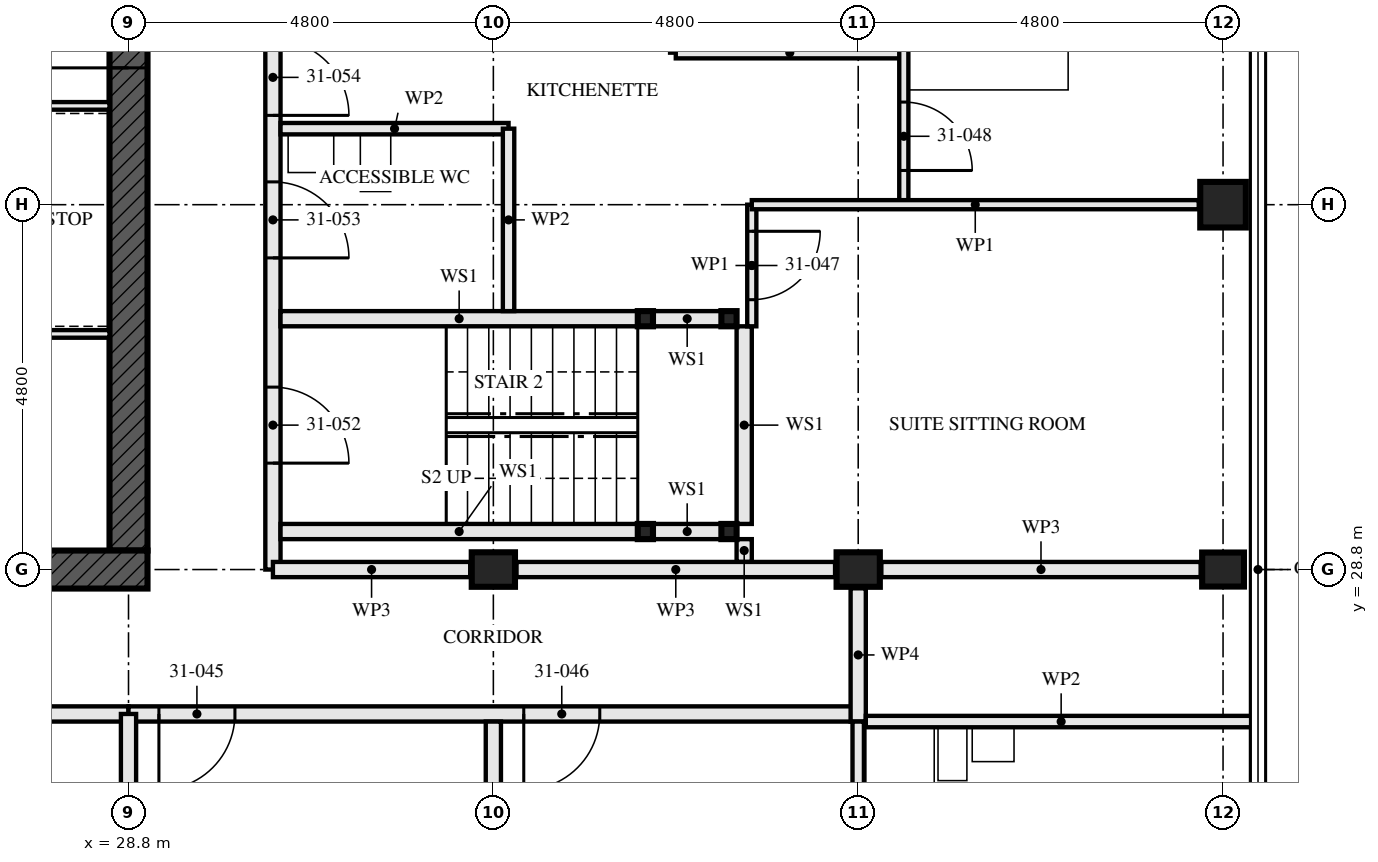
"""IFC4 building model, lengths in metres.
Left out: names, types, materials, properties, quantities, classifications, styles, units other than length and angle.
Written with IfcOpenShell. Run it as: python <this file> out.ifc"""

import sys

from ifc_helpers import new_model, si_unit, direction, frame, frame_2d, origin, origin_2d, place, context, subcontext, project, spatial, rectangle, hollow_rectangle, i_section, extrude, element, fill, save


model = new_model("IFC4")
c1 = context("Model", 3, precision=1e-05, world=origin(), true_north=direction((0.0, 1.0)))
c2 = subcontext(c1, "Body", "Model", "MODEL_VIEW")
j1 = project(units=[si_unit("LENGTHUNIT", "METRE"), si_unit("PLANEANGLEUNIT", "RADIAN")], contexts=[c1])
p1 = place(None, origin())
s1 = spatial("IfcSite", under=j1, at=p1, CompositionType="ELEMENT")
p2 = place(p1, origin())
s2 = spatial("IfcBuilding", under=s1, at=p2, CompositionType="ELEMENT")
p3 = place(p2, frame((0.0, 0.0, 115.5)))
s3 = spatial("IfcBuildingStorey", under=s2, at=p3, CompositionType="ELEMENT", Elevation=115.5)
for number, where, z_axis, x_axis in (
    (1, (33.6, 28.8, 0.0), (0.0, 0.0, 1.0), (0.0, 1.0, 0.0)),
    (2, (38.4, 28.8, 0.0), (0.0, 0.0, 1.0), (0.0, 1.0, 0.0)),
):
    element("IfcColumn", number, at=place(p3, frame(where, z_axis=z_axis, x_axis=x_axis)), inside=s3, PredefinedType="COLUMN", context=c2, shape_type="SweptSolid", body=[
        extrude(i_section(OverallWidth=0.454, OverallDepth=0.569, WebThickness=0.078, FlangeThickness=0.125, FilletRadius=0.015, at=origin_2d()), origin(), (0.0, 0.0, 1.0), 3.5),
    ])
p4 = place(p3, frame((43.2, 28.8, 0.0), z_axis=(0.0, 0.0, 1.0), x_axis=(0.0, 1.0, 0.0)))
e3 = element("IfcColumn", 3, at=p4, inside=s3, PredefinedType="COLUMN", context=c2, shape_type="SweptSolid", body=[
    extrude(i_section(OverallWidth=0.448, OverallDepth=0.55, WebThickness=0.072, FlangeThickness=0.115, FilletRadius=0.015, at=origin_2d()), origin(), (0.0, 0.0, 1.0), 3.5),
])
p5 = place(p3, frame((43.2, 33.6, 0.0), z_axis=(0.0, 0.0, 1.0), x_axis=(1.0, 0.0, 0.0)))
e4 = element("IfcColumn", 4, at=p5, inside=s3, PredefinedType="COLUMN", context=c2, shape_type="SweptSolid", body=[
    extrude(hollow_rectangle(XDim=0.6, YDim=0.6, WallThickness=0.08, at=origin_2d()), origin(), (0.0, 0.0, 1.0), 3.5),
])
p6 = place(p3, frame((14.15, 28.8, -0.17), z_axis=(0.0, 0.0, 1.0), x_axis=(1.0, 0.0, 0.0)))
e5 = element("IfcWall", 5, at=p6, inside=s3, PredefinedType="SHEAR", context=c2, shape_type="SweptSolid", body=[
    extrude(rectangle(XDim=14.9, YDim=0.5, at=frame_2d((7.45, 0.0))), origin(), (0.0, 0.0, 1.0), 3.5),
])
p7 = place(p6, frame((6.85, 0.0, 0.17)))
e6 = element("IfcOpeningElement", 6, at=p7, cuts=e5, PredefinedType="OPENING", context=c2, shape_type="SweptSolid", body=[
    extrude(rectangle(XDim=1.2, YDim=2.1, at=frame_2d((0.6, 1.05))), frame((0.0, 0.26, 0.0), z_axis=(0.0, -1.0, 0.0), x_axis=(1.0, 0.0, 0.0)), (0.0, 0.0, 1.0), 0.521),
])
p8 = place(p3, frame((28.8, 29.05, -0.17), z_axis=(0.0, 0.0, 1.0), x_axis=(0.0, 1.0, 0.0)))
e7 = element("IfcWall", 7, at=p8, inside=s3, PredefinedType="SHEAR", context=c2, shape_type="SweptSolid", body=[
    extrude(rectangle(XDim=13.9, YDim=0.5, at=frame_2d((6.95, 0.0))), origin(), (0.0, 0.0, 1.0), 3.5),
])
p9 = place(p8, frame((6.35, 0.0, 0.17)))
e8 = element("IfcOpeningElement", 8, at=p9, cuts=e7, PredefinedType="OPENING", context=c2, shape_type="SweptSolid", body=[
    extrude(rectangle(XDim=1.2, YDim=2.1, at=frame_2d((0.6, 1.05))), frame((0.0, 0.26, 0.0), z_axis=(0.0, -1.0, 0.0), x_axis=(1.0, 0.0, 0.0)), (0.0, 0.0, 1.0), 0.521),
])
for number, where, z_axis, x_axis in (
    (9, (36.7, 29.3, 0.0), (0.0, 0.0, 1.0), (1.0, 0.0, 0.0)),
    (10, (36.7, 32.1, 0.0), (0.0, 0.0, 1.0), (1.0, 0.0, 0.0)),
    (11, (35.6, 29.3, 0.0), (0.0, 0.0, 1.0), (1.0, 0.0, 0.0)),
    (12, (35.6, 32.1, 0.0), (0.0, 0.0, 1.0), (1.0, 0.0, 0.0)),
):
    element("IfcColumn", number, at=place(p3, frame(where, z_axis=z_axis, x_axis=x_axis)), inside=s3, PredefinedType="COLUMN", context=c2, shape_type="SweptSolid", body=[
        extrude(hollow_rectangle(XDim=0.2, YDim=0.2, WallThickness=0.008, at=origin_2d()), origin(), (0.0, 0.0, 1.0), 3.33),
    ])
p10 = place(p3, frame((13.96, 26.9, 0.0), z_axis=(0.0, 0.0, 1.0), x_axis=(1.0, 0.0, 0.0)))
e13 = element("IfcWall", 13, at=p10, inside=s3, PredefinedType="PARTITIONING", context=c2, shape_type="SweptSolid", body=[
    extrude(rectangle(XDim=14.84, YDim=0.2, at=frame_2d((7.42, 0.0))), origin(), (0.0, 0.0, 1.0), 2.32),
])
p11 = place(p10, frame((1.84, 0.0, 0.0)))
e14 = element("IfcOpeningElement", 14, at=p11, cuts=e13, PredefinedType="OPENING", context=c2, shape_type="SweptSolid", body=[
    extrude(rectangle(XDim=1.0, YDim=2.1, at=frame_2d((0.5, 1.05))), frame((0.0, 0.111, 0.0), z_axis=(0.0, -1.0, 0.0), x_axis=(1.0, 0.0, 0.0)), (0.0, 0.0, 1.0), 0.221),
])
p12 = place(p10, frame((4.09, 0.0, 0.0)))
e15 = element("IfcOpeningElement", 15, at=p12, cuts=e13, PredefinedType="OPENING", context=c2, shape_type="SweptSolid", body=[
    extrude(rectangle(XDim=0.9, YDim=2.1, at=frame_2d((0.45, 1.05))), frame((0.0, 0.111, 0.0), z_axis=(0.0, -1.0, 0.0), x_axis=(1.0, 0.0, 0.0)), (0.0, 0.0, 1.0), 0.221),
])
p13 = place(p10, frame((5.64, 0.0, 0.0)))
e16 = element("IfcOpeningElement", 16, at=p13, cuts=e13, PredefinedType="OPENING", context=c2, shape_type="SweptSolid", body=[
    extrude(rectangle(XDim=1.0, YDim=2.1, at=frame_2d((0.5, 1.05))), frame((0.0, 0.111, 0.0), z_axis=(0.0, -1.0, 0.0), x_axis=(1.0, 0.0, 0.0)), (0.0, 0.0, 1.0), 0.221),
])
p14 = place(p3, frame((33.6, 14.644, 0.0), z_axis=(0.0, 0.0, 1.0), x_axis=(0.0, 1.0, 0.0)))
e17 = element("IfcWall", 17, at=p14, inside=s3, PredefinedType="PARTITIONING", context=c2, shape_type="SweptSolid", body=[
    extrude(rectangle(XDim=12.156, YDim=0.2, at=frame_2d((6.078, 0.0))), origin(), (0.0, 0.0, 1.0), 2.55),
])
p15 = place(p3, frame((38.4, 23.8, 0.0), z_axis=(0.0, 0.0, 1.0), x_axis=(0.0, 1.0, 0.0)))
e18 = element("IfcWall", 18, at=p15, inside=s3, PredefinedType="PARTITIONING", context=c2, shape_type="SweptSolid", body=[
    extrude(rectangle(XDim=3.0, YDim=0.15, at=frame_2d((1.5, 0.0))), origin(), (0.0, 0.0, 1.0), 2.55),
])
p16 = place(p3, frame((28.8, 26.9, 0.0), z_axis=(0.0, 0.0, 1.0), x_axis=(1.0, 0.0, 0.0)))
e19 = element("IfcWall", 19, at=p16, inside=s3, PredefinedType="PARTITIONING", context=c2, shape_type="SweptSolid", body=[
    extrude(rectangle(XDim=9.6, YDim=0.2, at=frame_2d((4.8, 0.0))), origin(), (0.0, 0.0, 1.0), 3.33),
])
p17 = place(p16, frame((0.4, 0.0, 0.0)))
e20 = element("IfcOpeningElement", 20, at=p17, cuts=e19, PredefinedType="OPENING", context=c2, shape_type="SweptSolid", body=[
    extrude(rectangle(XDim=1.0, YDim=2.1, at=frame_2d((0.5, 1.05))), frame((0.0, 0.111, 0.0), z_axis=(0.0, -1.0, 0.0), x_axis=(1.0, 0.0, 0.0)), (0.0, 0.0, 1.0), 0.221),
])
p18 = place(p16, frame((5.2, 0.0, 0.0)))
e21 = element("IfcOpeningElement", 21, at=p18, cuts=e19, PredefinedType="OPENING", context=c2, shape_type="SweptSolid", body=[
    extrude(rectangle(XDim=1.0, YDim=2.1, at=frame_2d((0.5, 1.05))), frame((0.0, 0.111, 0.0), z_axis=(0.0, -1.0, 0.0), x_axis=(1.0, 0.0, 0.0)), (0.0, 0.0, 1.0), 0.221),
])
p19 = place(p3, frame((38.4, 26.8, 0.0), z_axis=(0.0, 0.0, 1.0), x_axis=(0.0, 1.0, 0.0)))
e22 = element("IfcWall", 22, at=p19, inside=s3, PredefinedType="PARTITIONING", context=c2, shape_type="SweptSolid", body=[
    extrude(rectangle(XDim=1.753, YDim=0.2, at=frame_2d((0.876, 0.0))), origin(), (0.0, 0.0, 1.0), 3.33),
])
p20 = place(p3, frame((36.6, 29.3, 0.0), z_axis=(0.0, 0.0, 1.0), x_axis=(-1.0, 0.0, 0.0)))
e23 = element("IfcWall", 23, at=p20, inside=s3, PredefinedType="SOLIDWALL", context=c2, shape_type="SweptSolid", body=[
    extrude(rectangle(XDim=0.9, YDim=0.2, at=frame_2d((0.45, 0.0))), origin(), (0.0, 0.0, 1.0), 2.99),
])
p21 = place(p3, frame((35.5, 29.3, 0.0), z_axis=(0.0, 0.0, 1.0), x_axis=(-1.0, 0.0, 0.0)))
e24 = element("IfcWall", 24, at=p21, inside=s3, PredefinedType="SOLIDWALL", context=c2, shape_type="SweptSolid", body=[
    extrude(rectangle(XDim=4.7, YDim=0.2, at=frame_2d((2.35, 0.0))), origin(), (0.0, 0.0, 1.0), 2.99),
])
p22 = place(p3, frame((36.6, 32.1, 0.0), z_axis=(0.0, 0.0, 1.0), x_axis=(-1.0, 0.0, 0.0)))
e25 = element("IfcWall", 25, at=p22, inside=s3, PredefinedType="SOLIDWALL", context=c2, shape_type="SweptSolid", body=[
    extrude(rectangle(XDim=0.9, YDim=0.2, at=frame_2d((0.45, 0.0))), origin(), (0.0, 0.0, 1.0), 2.99),
])
p23 = place(p3, frame((35.5, 32.1, 0.0), z_axis=(0.0, 0.0, 1.0), x_axis=(-1.0, 0.0, 0.0)))
e26 = element("IfcWall", 26, at=p23, inside=s3, PredefinedType="SOLIDWALL", context=c2, shape_type="SweptSolid", body=[
    extrude(rectangle(XDim=4.7, YDim=0.2, at=frame_2d((2.35, 0.0))), origin(), (0.0, 0.0, 1.0), 2.99),
])
p24 = place(p3, frame((36.9, 28.9, 0.0), z_axis=(0.0, 0.0, 1.0), x_axis=(0.0, 1.0, 0.0)))
e27 = element("IfcWall", 27, at=p24, inside=s3, PredefinedType="SOLIDWALL", context=c2, shape_type="SweptSolid", body=[
    extrude(rectangle(XDim=0.3, YDim=0.2, at=frame_2d((0.15, 0.0))), origin(), (0.0, 0.0, 1.0), 3.33),
])
p25 = place(p3, frame((36.9, 29.4, 0.0), z_axis=(0.0, 0.0, 1.0), x_axis=(0.0, 1.0, 0.0)))
e28 = element("IfcWall", 28, at=p25, inside=s3, PredefinedType="SOLIDWALL", context=c2, shape_type="SweptSolid", body=[
    extrude(rectangle(XDim=2.6, YDim=0.2, at=frame_2d((1.3, 0.0))), origin(), (0.0, 0.0, 1.0), 3.33),
])
p26 = place(p3, frame((33.8, 32.2, 0.0), z_axis=(0.0, 0.0, 1.0), x_axis=(0.0, 1.0, 0.0)))
e29 = element("IfcWall", 29, at=p26, inside=s3, PredefinedType="PARTITIONING", context=c2, shape_type="SweptSolid", body=[
    extrude(rectangle(XDim=2.4, YDim=0.15, at=frame_2d((1.2, 0.0))), origin(), (0.0, 0.0, 1.0), 2.55),
])
for number, where, z_axis, x_axis in (
    (30, (33.8, 34.6, 0.0), (0.0, 0.0, 1.0), (-1.0, 0.0, 0.0)),
    (31, (39.0, 35.6, 0.0), (0.0, 0.0, 1.0), (-1.0, 0.0, 0.0)),
):
    element("IfcWall", number, at=place(p3, frame(where, z_axis=z_axis, x_axis=x_axis)), inside=s3, PredefinedType="PARTITIONING", context=c2, shape_type="SweptSolid", body=[
        extrude(rectangle(XDim=3.0, YDim=0.15, at=frame_2d((1.5, 0.0))), origin(), (0.0, 0.0, 1.0), 3.33),
    ])
p27 = place(p3, frame((37.0, 32.0, 0.0), z_axis=(0.0, 0.0, 1.0), x_axis=(0.0, 1.0, 0.0)))
e32 = element("IfcWall", 32, at=p27, inside=s3, PredefinedType="PARTITIONING", context=c2, shape_type="SweptSolid", body=[
    extrude(rectangle(XDim=1.6, YDim=0.12, at=frame_2d((0.8, 0.0))), origin(), (0.0, 0.0, 1.0), 3.33),
])
p28 = place(p27, frame((0.35, 0.0, 0.0)))
e33 = element("IfcOpeningElement", 33, at=p28, cuts=e32, PredefinedType="OPENING", context=c2, shape_type="SweptSolid", body=[
    extrude(rectangle(XDim=0.9, YDim=2.1, at=frame_2d((0.45, 1.05))), frame((0.0, 0.071, 0.0), z_axis=(0.0, -1.0, 0.0), x_axis=(1.0, 0.0, 0.0)), (0.0, 0.0, 1.0), 0.141),
])
p29 = place(p3, frame((39.0, 33.6, 0.0), z_axis=(0.0, 0.0, 1.0), x_axis=(0.0, 1.0, 0.0)))
e34 = element("IfcWall", 34, at=p29, inside=s3, PredefinedType="PARTITIONING", context=c2, shape_type="SweptSolid", body=[
    extrude(rectangle(XDim=5.24, YDim=0.12, at=frame_2d((2.62, 0.0))), origin(), (0.0, 0.0, 1.0), 2.32),
])
p30 = place(p29, frame((0.45, 0.0, 0.0)))
e35 = element("IfcOpeningElement", 35, at=p30, cuts=e34, PredefinedType="OPENING", context=c2, shape_type="SweptSolid", body=[
    extrude(rectangle(XDim=0.9, YDim=2.1, at=frame_2d((0.45, 1.05))), frame((0.0, 0.071, 0.0), z_axis=(0.0, -1.0, 0.0), x_axis=(1.0, 0.0, 0.0)), (0.0, 0.0, 1.0), 0.141),
])
p31 = place(p29, frame((2.925, 0.0, 0.0)))
e36 = element("IfcOpeningElement", 36, at=p31, cuts=e34, PredefinedType="OPENING", context=c2, shape_type="SweptSolid", body=[
    extrude(rectangle(XDim=0.95, YDim=2.1, at=frame_2d((0.475, 1.05))), frame((0.0, 0.071, 0.0), z_axis=(0.0, -1.0, 0.0), x_axis=(1.0, 0.0, 0.0)), (0.0, 0.0, 1.0), 0.141),
])
p32 = place(p3, frame((42.88, 33.6, 0.0), z_axis=(0.0, 0.0, 1.0), x_axis=(-1.0, 0.0, 0.0)))
e37 = element("IfcWall", 37, at=p32, inside=s3, PredefinedType="PARTITIONING", context=c2, shape_type="SweptSolid", body=[
    extrude(rectangle(XDim=5.88, YDim=0.12, at=frame_2d((2.94, 0.0))), origin(), (0.0, 0.0, 1.0), 2.55),
])
p33 = place(p3, frame((30.7, 28.8, 0.0), z_axis=(0.0, 0.0, 1.0), x_axis=(0.0, 1.0, 0.0)))
e38 = element("IfcWall", 38, at=p33, inside=s3, PredefinedType="PARTITIONING", context=c2, shape_type="SweptSolid", body=[
    extrude(rectangle(XDim=14.84, YDim=0.2, at=frame_2d((7.42, 0.0))), origin(), (0.0, 0.0, 1.0), 2.32),
])
p34 = place(p33, frame((1.4, 0.0, 0.0)))
e39 = element("IfcOpeningElement", 39, at=p34, cuts=e38, PredefinedType="OPENING", context=c2, shape_type="SweptSolid", body=[
    extrude(rectangle(XDim=1.0, YDim=2.1, at=frame_2d((0.5, 1.05))), frame((0.0, 0.111, 0.0), z_axis=(0.0, -1.0, 0.0), x_axis=(1.0, 0.0, 0.0)), (0.0, 0.0, 1.0), 0.221),
])
p35 = place(p33, frame((4.1, 0.0, 0.0)))
e40 = element("IfcOpeningElement", 40, at=p35, cuts=e38, PredefinedType="OPENING", context=c2, shape_type="SweptSolid", body=[
    extrude(rectangle(XDim=1.0, YDim=2.1, at=frame_2d((0.5, 1.05))), frame((0.0, 0.111, 0.0), z_axis=(0.0, -1.0, 0.0), x_axis=(1.0, 0.0, 0.0)), (0.0, 0.0, 1.0), 0.221),
])
p36 = place(p33, frame((5.975, 0.0, 0.0)))
e41 = element("IfcOpeningElement", 41, at=p36, cuts=e38, PredefinedType="OPENING", context=c2, shape_type="SweptSolid", body=[
    extrude(rectangle(XDim=1.0, YDim=2.1, at=frame_2d((0.5, 1.05))), frame((0.0, 0.111, 0.0), z_axis=(0.0, -1.0, 0.0), x_axis=(1.0, 0.0, 0.0)), (0.0, 0.0, 1.0), 0.221),
])
p37 = place(p33, frame((13.0, 0.0, 0.0)))
e42 = element("IfcOpeningElement", 42, at=p37, cuts=e38, PredefinedType="OPENING", context=c2, shape_type="SweptSolid", body=[
    extrude(rectangle(XDim=1.0, YDim=2.1, at=frame_2d((0.5, 1.05))), frame((0.0, 0.111, 0.0), z_axis=(0.0, -1.0, 0.0), x_axis=(1.0, 0.0, 0.0)), (0.0, 0.0, 1.0), 0.221),
])
p38 = place(p3, frame((23.05, 34.9, 0.0), z_axis=(0.0, 0.0, 1.0), x_axis=(1.0, 0.0, 0.0)))
e43 = element("IfcWall", 43, at=p38, inside=s3, PredefinedType="SOLIDWALL", context=c2, shape_type="SweptSolid", body=[
    extrude(rectangle(XDim=5.5, YDim=0.1, at=frame_2d((2.75, 0.0))), origin(), (0.0, 0.0, 1.0), 3.33),
])
p39 = place(p3, frame((23.15, 31.9, 0.0), z_axis=(0.0, 0.0, 1.0), x_axis=(1.0, 0.0, 0.0)))
e44 = element("IfcWall", 44, at=p39, inside=s3, PredefinedType="SOLIDWALL", context=c2, shape_type="SweptSolid", body=[
    extrude(rectangle(XDim=5.4, YDim=0.1, at=frame_2d((2.7, 0.0))), origin(), (0.0, 0.0, 1.0), 3.33),
])
p40 = place(p3, frame((28.8, 24.304, 0.0), z_axis=(0.0, 0.0, 1.0), x_axis=(0.0, 1.0, 0.0)))
e45 = element("IfcWall", 45, at=p40, inside=s3, PredefinedType="PARTITIONING", context=c2, shape_type="SweptSolid", body=[
    extrude(rectangle(XDim=2.595, YDim=0.2, at=frame_2d((1.298, 0.0))), origin(), (0.0, 0.0, 1.0), 2.32),
])
p41 = place(p3, frame((42.905, 28.8, 0.0), z_axis=(0.0, 0.0, 1.0), x_axis=(-1.0, 0.0, 0.0)))
e46 = element("IfcWall", 46, at=p41, inside=s3, PredefinedType="PARTITIONING", context=c2, shape_type="SweptSolid", body=[
    extrude(rectangle(XDim=4.2, YDim=0.2, at=frame_2d((2.1, 0.0))), origin(), (0.0, 0.0, 1.0), 2.32),
])
p42 = place(p3, frame((38.095, 28.8, 0.0), z_axis=(0.0, 0.0, 1.0), x_axis=(-1.0, 0.0, 0.0)))
e47 = element("IfcWall", 47, at=p42, inside=s3, PredefinedType="PARTITIONING", context=c2, shape_type="SweptSolid", body=[
    extrude(rectangle(XDim=4.191, YDim=0.2, at=frame_2d((2.095, 0.0))), origin(), (0.0, 0.0, 1.0), 2.32),
])
p43 = place(p3, frame((33.295, 28.8, 0.0), z_axis=(0.0, 0.0, 1.0), x_axis=(-1.0, 0.0, 0.0)))
e48 = element("IfcWall", 48, at=p43, inside=s3, PredefinedType="PARTITIONING", context=c2, shape_type="SweptSolid", body=[
    extrude(rectangle(XDim=2.595, YDim=0.2, at=frame_2d((1.298, 0.0))), origin(), (0.0, 0.0, 1.0), 2.32),
])
p44 = place(p3, frame((38.5, 26.8, 0.0), z_axis=(0.0, 0.0, 1.0), x_axis=(1.0, 0.0, 0.0)))
e49 = element("IfcWall", 49, at=p44, inside=s3, PredefinedType="PARTITIONING", context=c2, shape_type="SweptSolid", body=[
    extrude(rectangle(XDim=5.14, YDim=0.15, at=frame_2d((2.57, 0.0))), origin(), (0.0, 0.0, 1.0), 2.32),
])
p45 = place(p17, frame((1.0, 0.0, 0.0), z_axis=(0.0, 0.0, 1.0), x_axis=(-1.0, 0.0, 0.0)))
e50 = element("IfcDoor", 50, at=p45, inside=s3, OperationType="SINGLE_SWING_LEFT", PredefinedType="DOOR", context=c2, shape_type="SweptSolid", body=[
    extrude(rectangle(XDim=1.0, YDim=2.1, at=frame_2d((0.5, 1.05))), frame((0.0, 0.027, 0.0), z_axis=(0.0, -1.0, 0.0), x_axis=(1.0, 0.0, 0.0)), (0.0, 0.0, 1.0), 0.054),
])
fill(e20, e50)
p46 = place(p18, frame((1.0, 0.0, 0.0), z_axis=(0.0, 0.0, 1.0), x_axis=(-1.0, 0.0, 0.0)))
e51 = element("IfcDoor", 51, at=p46, inside=s3, OperationType="SINGLE_SWING_LEFT", PredefinedType="DOOR", context=c2, shape_type="SweptSolid", body=[
    extrude(rectangle(XDim=1.0, YDim=2.1, at=frame_2d((0.5, 1.05))), frame((0.0, 0.027, 0.0), z_axis=(0.0, -1.0, 0.0), x_axis=(1.0, 0.0, 0.0)), (0.0, 0.0, 1.0), 0.054),
])
fill(e21, e51)
p47 = place(p28, frame((0.9, 0.0, 0.0), z_axis=(0.0, 0.0, 1.0), x_axis=(-1.0, 0.0, 0.0)))
e52 = element("IfcDoor", 52, at=p47, inside=s3, OperationType="SINGLE_SWING_RIGHT", PredefinedType="DOOR", context=c2, shape_type="SweptSolid", body=[
    extrude(rectangle(XDim=0.9, YDim=2.1, at=frame_2d((0.45, 1.05))), frame((0.0, 0.022, 0.0), z_axis=(0.0, -1.0, 0.0), x_axis=(1.0, 0.0, 0.0)), (0.0, 0.0, 1.0), 0.044),
])
fill(e33, e52)
p48 = place(p30, frame((0.9, 0.0, 0.0), z_axis=(0.0, 0.0, 1.0), x_axis=(-1.0, 0.0, 0.0)))
e53 = element("IfcDoor", 53, at=p48, inside=s3, OperationType="SINGLE_SWING_LEFT", PredefinedType="DOOR", context=c2, shape_type="SweptSolid", body=[
    extrude(rectangle(XDim=0.9, YDim=2.1, at=frame_2d((0.45, 1.05))), frame((0.0, 0.022, 0.0), z_axis=(0.0, -1.0, 0.0), x_axis=(1.0, 0.0, 0.0)), (0.0, 0.0, 1.0), 0.044),
])
fill(e35, e53)
p49 = place(p34, frame((1.0, 0.0, 0.0), z_axis=(0.0, 0.0, 1.0), x_axis=(-1.0, 0.0, 0.0)))
e54 = element("IfcDoor", 54, at=p49, inside=s3, OperationType="SINGLE_SWING_LEFT", PredefinedType="DOOR", context=c2, shape_type="SweptSolid", body=[
    extrude(rectangle(XDim=1.0, YDim=2.1, at=frame_2d((0.5, 1.05))), frame((0.0, 0.032, 0.0), z_axis=(0.0, -1.0, 0.0), x_axis=(1.0, 0.0, 0.0)), (0.0, 0.0, 1.0), 0.064),
])
fill(e39, e54)
p50 = place(p35, frame((1.0, 0.0, 0.0), z_axis=(0.0, 0.0, 1.0), x_axis=(-1.0, 0.0, 0.0)))
e55 = element("IfcDoor", 55, at=p50, inside=s3, OperationType="SINGLE_SWING_LEFT", PredefinedType="DOOR", context=c2, shape_type="SweptSolid", body=[
    extrude(rectangle(XDim=1.0, YDim=2.1, at=frame_2d((0.5, 1.05))), frame((0.0, 0.027, 0.0), z_axis=(0.0, -1.0, 0.0), x_axis=(1.0, 0.0, 0.0)), (0.0, 0.0, 1.0), 0.054),
])
fill(e40, e55)
p51 = place(p36, frame((1.0, 0.0, 0.0), z_axis=(0.0, 0.0, 1.0), x_axis=(-1.0, 0.0, 0.0)))
e56 = element("IfcDoor", 56, at=p51, inside=s3, OperationType="SINGLE_SWING_LEFT", PredefinedType="DOOR", context=c2, shape_type="SweptSolid", body=[
    extrude(rectangle(XDim=1.0, YDim=2.1, at=frame_2d((0.5, 1.05))), frame((0.0, 0.027, 0.0), z_axis=(0.0, -1.0, 0.0), x_axis=(1.0, 0.0, 0.0)), (0.0, 0.0, 1.0), 0.054),
])
fill(e41, e56)
p52 = place(p9, origin())
e57 = element("IfcDoor", 57, at=p52, inside=s3, OperationType="SINGLE_SWING_LEFT", PredefinedType="DOOR", context=c2, shape_type="SweptSolid", body=[
    extrude(rectangle(XDim=1.2, YDim=2.1, at=frame_2d((0.6, 1.05))), frame((0.0, 0.027, 0.0), z_axis=(0.0, -1.0, 0.0), x_axis=(1.0, 0.0, 0.0)), (0.0, 0.0, 1.0), 0.054),
])
fill(e8, e57)
save(model, sys.argv[1])
